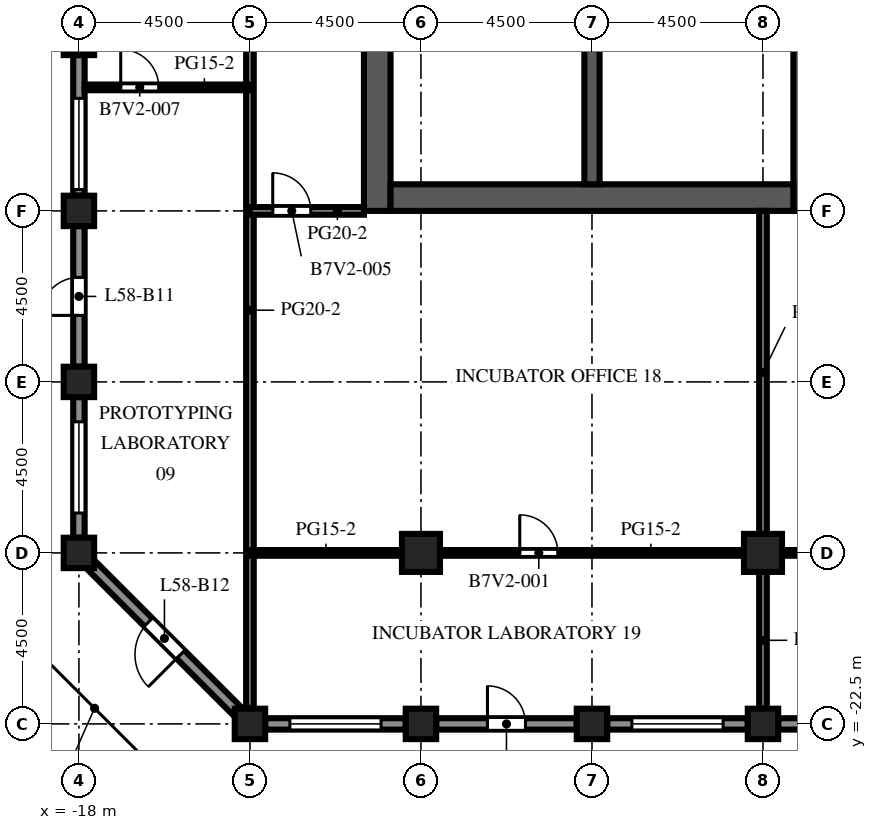
"""IFC4 building model, lengths in metres.
Left out: names, types, materials, properties, quantities, classifications, styles, units other than length and angle.
Written with IfcOpenShell. Run it as: python <this file> out.ifc"""

import sys

from ifc_helpers import new_model, si_unit, direction, frame, frame_2d, origin, origin_2d, place, context, subcontext, project, spatial, rectangle, extrude, element, fill, save


model = new_model("IFC4")
c1 = context("Model", 3, precision=1e-05, world=origin(), true_north=direction((0.0, 1.0)))
c2 = subcontext(c1, "Body", "Model", "MODEL_VIEW")
j1 = project(units=[si_unit("LENGTHUNIT", "METRE"), si_unit("PLANEANGLEUNIT", "RADIAN")], contexts=[c1])
p1 = place(None, origin())
s1 = spatial("IfcSite", under=j1, at=p1, CompositionType="ELEMENT")
p2 = place(p1, origin())
s2 = spatial("IfcBuilding", under=s1, at=p2, CompositionType="ELEMENT")
p3 = place(p2, frame((0.0, 0.0, 256.2)))
s3 = spatial("IfcBuildingStorey", under=s2, at=p3, CompositionType="ELEMENT", Elevation=256.2)
for number, where, z_axis, x_axis in (
    (1, (-18.0, -18.0, 0.0), (0.0, 0.0, 1.0), (1.0, 0.0, 0.0)),
    (2, (-18.0, -13.5, 0.0), (0.0, 0.0, 1.0), (1.0, 0.0, 0.0)),
    (3, (-18.0, -9.0, 0.0), (0.0, 0.0, 1.0), (1.0, 0.0, 0.0)),
    (4, (-18.0, -4.5, 0.0), (0.0, 0.0, 1.0), (1.0, 0.0, 0.0)),
    (5, (-13.5, -22.5, 0.0), (0.0, 0.0, 1.0), (1.0, 0.0, 0.0)),
    (6, (-9.0, -22.5, 0.0), (0.0, 0.0, 1.0), (1.0, 0.0, 0.0)),
    (7, (-4.5, -22.5, 0.0), (0.0, 0.0, 1.0), (1.0, 0.0, 0.0)),
    (8, (0.0, -22.5, 0.0), (0.0, 0.0, 1.0), (1.0, 0.0, 0.0)),
):
    element("IfcColumn", number, at=place(p3, frame(where, z_axis=z_axis, x_axis=x_axis)), inside=s3, PredefinedType="COLUMN", context=c2, shape_type="SweptSolid", body=[
        extrude(rectangle(XDim=0.8, YDim=0.8, at=origin_2d()), origin(), (0.0, 0.0, 1.0), 4.1),
    ])
for number, where, z_axis, x_axis in (
    (9, (-9.0, -18.0, 0.0), (0.0, 0.0, 1.0), (1.0, 0.0, 0.0)),
    (10, (0.0, -18.0, 0.0), (0.0, 0.0, 1.0), (1.0, 0.0, 0.0)),
):
    element("IfcColumn", number, at=place(p3, frame(where, z_axis=z_axis, x_axis=x_axis)), inside=s3, PredefinedType="COLUMN", context=c2, shape_type="SweptSolid", body=[
        extrude(rectangle(XDim=1.0, YDim=1.0, at=origin_2d()), origin(), (0.0, 0.0, 1.0), 4.1),
    ])
p4 = place(p3, frame((-10.15, -9.0, 0.0), z_axis=(0.0, 0.0, 1.0), x_axis=(0.0, 1.0, 0.0)))
e11 = element("IfcWall", 11, at=p4, inside=s3, PredefinedType="SHEAR", context=c2, shape_type="SweptSolid", body=[
    extrude(rectangle(XDim=27.5, YDim=0.7, at=frame_2d((13.75, 0.0))), origin(), (0.0, 0.0, 1.0), 4.1),
])
p5 = place(p4, frame((12.55, 0.0, 0.0)))
e12 = element("IfcOpeningElement", 12, at=p5, cuts=e11, PredefinedType="OPENING", context=c2, shape_type="SweptSolid", body=[
    extrude(rectangle(XDim=2.4, YDim=2.4, at=frame_2d((1.2, 1.2))), frame((0.0, 0.36, 0.0), z_axis=(0.0, -1.0, 0.0), x_axis=(1.0, 0.0, 0.0)), (0.0, 0.0, 1.0), 0.72),
])
p6 = place(p4, frame((6.825, 0.0, 0.0)))
e13 = element("IfcOpeningElement", 13, at=p6, cuts=e11, PredefinedType="OPENING", context=c2, shape_type="SweptSolid", body=[
    extrude(rectangle(XDim=1.2, YDim=2.1, at=frame_2d((0.6, 1.05))), frame((0.0, 0.36, 0.0), z_axis=(0.0, -1.0, 0.0), x_axis=(1.0, 0.0, 0.0)), (0.0, 0.0, 1.0), 0.72),
])
p7 = place(p4, frame((19.475, 0.0, 0.0)))
e14 = element("IfcOpeningElement", 14, at=p7, cuts=e11, PredefinedType="OPENING", context=c2, shape_type="SweptSolid", body=[
    extrude(rectangle(XDim=1.2, YDim=2.1, at=frame_2d((0.6, 1.05))), frame((0.0, 0.36, 0.0), z_axis=(0.0, -1.0, 0.0), x_axis=(1.0, 0.0, 0.0)), (0.0, 0.0, 1.0), 0.72),
])
p8 = place(p3, frame((1.15, -9.0, 0.0), z_axis=(0.0, 0.0, 1.0), x_axis=(0.0, 1.0, 0.0)))
e15 = element("IfcWall", 15, at=p8, inside=s3, PredefinedType="SHEAR", context=c2, shape_type="SweptSolid", body=[
    extrude(rectangle(XDim=27.5, YDim=0.7, at=frame_2d((13.75, 0.0))), origin(), (0.0, 0.0, 1.0), 4.1),
])
p9 = place(p8, frame((12.55, 0.0, 0.0)))
e16 = element("IfcOpeningElement", 16, at=p9, cuts=e15, PredefinedType="OPENING", context=c2, shape_type="SweptSolid", body=[
    extrude(rectangle(XDim=2.4, YDim=2.4, at=frame_2d((1.2, 1.2))), frame((0.0, 0.36, 0.0), z_axis=(0.0, -1.0, 0.0), x_axis=(1.0, 0.0, 0.0)), (0.0, 0.0, 1.0), 0.72),
])
p10 = place(p8, frame((3.788, 0.0, 0.0)))
e17 = element("IfcOpeningElement", 17, at=p10, cuts=e15, PredefinedType="OPENING", context=c2, shape_type="SweptSolid", body=[
    extrude(rectangle(XDim=0.968, YDim=2.1, at=frame_2d((0.484, 1.05))), frame((0.0, 0.36, 0.0), z_axis=(0.0, -1.0, 0.0), x_axis=(1.0, 0.0, 0.0)), (0.0, 0.0, 1.0), 0.72),
])
p11 = place(p8, frame((23.54, 0.0, 0.0)))
e18 = element("IfcOpeningElement", 18, at=p11, cuts=e15, PredefinedType="OPENING", context=c2, shape_type="SweptSolid", body=[
    extrude(rectangle(XDim=1.2, YDim=2.1, at=frame_2d((0.6, 1.05))), frame((0.0, 0.36, 0.0), z_axis=(0.0, -1.0, 0.0), x_axis=(1.0, 0.0, 0.0)), (0.0, 0.0, 1.0), 0.72),
])
p12 = place(p3, frame((-9.8, -8.65, 0.0), z_axis=(0.0, 0.0, 1.0), x_axis=(1.0, 0.0, 0.0)))
e19 = element("IfcWall", 19, at=p12, inside=s3, PredefinedType="SHEAR", context=c2, shape_type="SweptSolid", body=[
    extrude(rectangle(XDim=10.6, YDim=0.7, at=frame_2d((5.3, 0.0))), origin(), (0.0, 0.0, 1.0), 4.1),
])
p13 = place(p3, frame((-4.5, -8.3, 0.0), z_axis=(0.0, 0.0, 1.0), x_axis=(0.0, 1.0, 0.0)))
e20 = element("IfcWall", 20, at=p13, inside=s3, PredefinedType="SHEAR", context=c2, shape_type="SweptSolid", body=[
    extrude(rectangle(XDim=7.6, YDim=0.4, at=frame_2d((3.8, 0.0))), origin(), (0.0, 0.0, 1.0), 4.1),
])
p14 = place(p3, frame((-9.4, -22.5, 0.0), z_axis=(0.0, 0.0, 1.0), x_axis=(-1.0, 0.0, 0.0)))
e21 = element("IfcWall", 21, at=p14, inside=s3, PredefinedType="SOLIDWALL", context=c2, shape_type="SweptSolid", body=[
    extrude(rectangle(XDim=3.7, YDim=0.3, at=frame_2d((1.85, 0.0))), origin(), (0.0, 0.0, 1.0), 2.7),
])
p15 = place(p14, frame((0.65, 0.0, 0.8)))
e22 = element("IfcOpeningElement", 22, at=p15, cuts=e21, PredefinedType="OPENING", context=c2, shape_type="SweptSolid", body=[
    extrude(rectangle(XDim=2.4, YDim=1.7, at=frame_2d((1.2, 0.85))), frame((0.0, 0.16, 0.0), z_axis=(0.0, -1.0, 0.0), x_axis=(1.0, 0.0, 0.0)), (0.0, 0.0, 1.0), 0.32),
])
p16 = place(p3, frame((-4.9, -22.5, 0.0), z_axis=(0.0, 0.0, 1.0), x_axis=(-1.0, 0.0, 0.0)))
e23 = element("IfcWall", 23, at=p16, inside=s3, PredefinedType="SOLIDWALL", context=c2, shape_type="SweptSolid", body=[
    extrude(rectangle(XDim=3.7, YDim=0.3, at=frame_2d((1.85, 0.0))), origin(), (0.0, 0.0, 1.0), 2.7),
])
p17 = place(p16, frame((1.35, 0.0, 0.0)))
e24 = element("IfcOpeningElement", 24, at=p17, cuts=e23, PredefinedType="OPENING", context=c2, shape_type="SweptSolid", body=[
    extrude(rectangle(XDim=1.0, YDim=2.2, at=frame_2d((0.5, 1.1))), frame((0.0, 0.16, 0.0), z_axis=(0.0, -1.0, 0.0), x_axis=(1.0, 0.0, 0.0)), (0.0, 0.0, 1.0), 0.32),
])
p18 = place(p3, frame((-0.4, -22.5, 0.0), z_axis=(0.0, 0.0, 1.0), x_axis=(-1.0, 0.0, 0.0)))
e25 = element("IfcWall", 25, at=p18, inside=s3, PredefinedType="SOLIDWALL", context=c2, shape_type="SweptSolid", body=[
    extrude(rectangle(XDim=3.7, YDim=0.3, at=frame_2d((1.85, 0.0))), origin(), (0.0, 0.0, 1.0), 2.7),
])
p19 = place(p18, frame((0.65, 0.0, 0.8)))
e26 = element("IfcOpeningElement", 26, at=p19, cuts=e25, PredefinedType="OPENING", context=c2, shape_type="SweptSolid", body=[
    extrude(rectangle(XDim=2.4, YDim=1.7, at=frame_2d((1.2, 0.85))), frame((0.0, 0.16, 0.0), z_axis=(0.0, -1.0, 0.0), x_axis=(1.0, 0.0, 0.0)), (0.0, 0.0, 1.0), 0.32),
])
p20 = place(p3, frame((4.1, -22.5, 0.0), z_axis=(0.0, 0.0, 1.0), x_axis=(-1.0, 0.0, 0.0)))
e27 = element("IfcWall", 27, at=p20, inside=s3, PredefinedType="SOLIDWALL", context=c2, shape_type="SweptSolid", body=[
    extrude(rectangle(XDim=3.7, YDim=0.3, at=frame_2d((1.85, 0.0))), origin(), (0.0, 0.0, 1.0), 2.7),
])
p21 = place(p20, frame((0.65, 0.0, 0.8)))
e28 = element("IfcOpeningElement", 28, at=p21, cuts=e27, PredefinedType="OPENING", context=c2, shape_type="SweptSolid", body=[
    extrude(rectangle(XDim=2.4, YDim=1.7, at=frame_2d((1.2, 0.85))), frame((0.0, 0.16, 0.0), z_axis=(0.0, -1.0, 0.0), x_axis=(1.0, 0.0, 0.0)), (0.0, 0.0, 1.0), 0.32),
])
p22 = place(p3, frame((-18.0, -8.6, 0.0), z_axis=(0.0, 0.0, 1.0), x_axis=(0.0, 1.0, 0.0)))
e29 = element("IfcWall", 29, at=p22, inside=s3, PredefinedType="SOLIDWALL", context=c2, shape_type="SweptSolid", body=[
    extrude(rectangle(XDim=3.7, YDim=0.3, at=frame_2d((1.85, 0.0))), origin(), (0.0, 0.0, 1.0), 2.7),
])
p23 = place(p22, frame((0.163, 0.0, 0.8)))
e30 = element("IfcOpeningElement", 30, at=p23, cuts=e29, PredefinedType="OPENING", context=c2, shape_type="SweptSolid", body=[
    extrude(rectangle(XDim=2.4, YDim=1.7, at=frame_2d((1.2, 0.85))), frame((0.0, 0.16, 0.0), z_axis=(0.0, -1.0, 0.0), x_axis=(1.0, 0.0, 0.0)), (0.0, 0.0, 1.0), 0.32),
])
p24 = place(p3, frame((-18.0, -13.1, 0.0), z_axis=(0.0, 0.0, 1.0), x_axis=(0.0, 1.0, 0.0)))
e31 = element("IfcWall", 31, at=p24, inside=s3, PredefinedType="SOLIDWALL", context=c2, shape_type="SweptSolid", body=[
    extrude(rectangle(XDim=3.7, YDim=0.3, at=frame_2d((1.85, 0.0))), origin(), (0.0, 0.0, 1.0), 2.7),
])
p25 = place(p24, frame((1.35, 0.0, 0.0)))
e32 = element("IfcOpeningElement", 32, at=p25, cuts=e31, PredefinedType="OPENING", context=c2, shape_type="SweptSolid", body=[
    extrude(rectangle(XDim=1.0, YDim=2.2, at=frame_2d((0.5, 1.1))), frame((0.0, 0.16, 0.0), z_axis=(0.0, -1.0, 0.0), x_axis=(1.0, 0.0, 0.0)), (0.0, 0.0, 1.0), 0.32),
])
p26 = place(p3, frame((-18.0, -17.6, 0.0), z_axis=(0.0, 0.0, 1.0), x_axis=(0.0, 1.0, 0.0)))
e33 = element("IfcWall", 33, at=p26, inside=s3, PredefinedType="SOLIDWALL", context=c2, shape_type="SweptSolid", body=[
    extrude(rectangle(XDim=3.7, YDim=0.3, at=frame_2d((1.85, 0.0))), origin(), (0.0, 0.0, 1.0), 2.7),
])
p27 = place(p26, frame((0.65, 0.0, 0.8)))
e34 = element("IfcOpeningElement", 34, at=p27, cuts=e33, PredefinedType="OPENING", context=c2, shape_type="SweptSolid", body=[
    extrude(rectangle(XDim=2.4, YDim=1.7, at=frame_2d((1.2, 0.85))), frame((0.0, 0.16, 0.0), z_axis=(0.0, -1.0, 0.0), x_axis=(1.0, 0.0, 0.0)), (0.0, 0.0, 1.0), 0.32),
])
p28 = place(p3, frame((-13.794, -22.206, 0.0), z_axis=(0.0, 0.0, 1.0), x_axis=(-0.707106781187, 0.707106781187, 0.0)))
e35 = element("IfcWall", 35, at=p28, inside=s3, PredefinedType="SOLIDWALL", context=c2, shape_type="SweptSolid", body=[
    extrude(rectangle(XDim=5.532, YDim=0.3, at=frame_2d((2.766, 0.0))), origin(), (0.0, 0.0, 1.0), 2.7),
])
p29 = place(p28, frame((2.166, 0.0, 0.0)))
e36 = element("IfcOpeningElement", 36, at=p29, cuts=e35, PredefinedType="OPENING", context=c2, shape_type="SweptSolid", body=[
    extrude(rectangle(XDim=1.2, YDim=2.2, at=frame_2d((0.6, 1.1))), frame((0.0, 0.16, 0.0), z_axis=(0.0, -1.0, 0.0), x_axis=(1.0, 0.0, 0.0)), (0.0, 0.0, 1.0), 0.32),
])
p30 = place(p3, frame((-4.3, -5.412, 0.0), z_axis=(0.0, 0.0, 1.0), x_axis=(1.0, 0.0, 0.0)))
e37 = element("IfcWall", 37, at=p30, inside=s3, PredefinedType="PARTITIONING", context=c2, shape_type="SweptSolid", body=[
    extrude(rectangle(XDim=5.1, YDim=0.1, at=frame_2d((2.55, 0.0))), origin(), (0.0, 0.0, 1.0), 3.5),
])
p31 = place(p30, frame((2.05, 0.0, 0.0)))
e38 = element("IfcOpeningElement", 38, at=p31, cuts=e37, PredefinedType="OPENING", context=c2, shape_type="SweptSolid", body=[
    extrude(rectangle(XDim=1.0, YDim=2.1, at=frame_2d((0.5, 1.05))), frame((0.0, 0.06, 0.0), z_axis=(0.0, -1.0, 0.0), x_axis=(1.0, 0.0, 0.0)), (0.0, 0.0, 1.0), 0.12),
])
p32 = place(p3, frame((-13.5, -22.077, 0.0), z_axis=(0.0, 0.0, 1.0), x_axis=(0.0, 1.0, 0.0)))
e39 = element("IfcWall", 39, at=p32, inside=s3, PredefinedType="PARTITIONING", context=c2, shape_type="SweptSolid", body=[
    extrude(rectangle(XDim=25.327, YDim=0.2, at=frame_2d((12.664, 0.0))), origin(), (0.0, 0.0, 1.0), 3.5),
])
p33 = place(p32, frame((20.927, 0.0, 0.0)))
e40 = element("IfcOpeningElement", 40, at=p33, cuts=e39, PredefinedType="OPENING", context=c2, shape_type="SweptSolid", body=[
    extrude(rectangle(XDim=1.0, YDim=2.1, at=frame_2d((0.5, 1.05))), frame((0.0, 0.11, 0.0), z_axis=(0.0, -1.0, 0.0), x_axis=(1.0, 0.0, 0.0)), (0.0, 0.0, 1.0), 0.22),
])
p34 = place(p3, frame((0.0, -22.1, 0.0), z_axis=(0.0, 0.0, 1.0), x_axis=(0.0, 1.0, 0.0)))
e41 = element("IfcWall", 41, at=p34, inside=s3, PredefinedType="PARTITIONING", context=c2, shape_type="SweptSolid", body=[
    extrude(rectangle(XDim=3.6, YDim=0.2, at=frame_2d((1.8, 0.0))), origin(), (0.0, 0.0, 1.0), 3.5),
])
p35 = place(p3, frame((0.0, -17.5, 0.0), z_axis=(0.0, 0.0, 1.0), x_axis=(0.0, 1.0, 0.0)))
e42 = element("IfcWall", 42, at=p35, inside=s3, PredefinedType="PARTITIONING", context=c2, shape_type="SweptSolid", body=[
    extrude(rectangle(XDim=8.5, YDim=0.2, at=frame_2d((4.25, 0.0))), origin(), (0.0, 0.0, 1.0), 3.5),
])
p36 = place(p3, frame((-13.5, -18.0, 0.0), z_axis=(0.0, 0.0, 1.0), x_axis=(1.0, 0.0, 0.0)))
e43 = element("IfcWall", 43, at=p36, inside=s3, PredefinedType="PARTITIONING", context=c2, shape_type="SweptSolid", body=[
    extrude(rectangle(XDim=4.0, YDim=0.15, at=frame_2d((2.0, 0.0))), origin(), (0.0, 0.0, 1.0), 3.5),
])
p37 = place(p3, frame((-0.5, -18.0, 0.0), z_axis=(0.0, 0.0, 1.0), x_axis=(-1.0, 0.0, 0.0)))
e44 = element("IfcWall", 44, at=p37, inside=s3, PredefinedType="PARTITIONING", context=c2, shape_type="SweptSolid", body=[
    extrude(rectangle(XDim=8.0, YDim=0.15, at=frame_2d((4.0, 0.0))), origin(), (0.0, 0.0, 1.0), 3.5),
])
p38 = place(p37, frame((4.9, 0.0, 0.0)))
e45 = element("IfcOpeningElement", 45, at=p38, cuts=e44, PredefinedType="OPENING", context=c2, shape_type="SweptSolid", body=[
    extrude(rectangle(XDim=1.0, YDim=2.1, at=frame_2d((0.5, 1.05))), frame((0.0, 0.085, 0.0), z_axis=(0.0, -1.0, 0.0), x_axis=(1.0, 0.0, 0.0)), (0.0, 0.0, 1.0), 0.17),
])
p39 = place(p3, frame((8.5, -18.0, 0.0), z_axis=(0.0, 0.0, 1.0), x_axis=(-1.0, 0.0, 0.0)))
e46 = element("IfcWall", 46, at=p39, inside=s3, PredefinedType="PARTITIONING", context=c2, shape_type="SweptSolid", body=[
    extrude(rectangle(XDim=8.0, YDim=0.15, at=frame_2d((4.0, 0.0))), origin(), (0.0, 0.0, 1.0), 3.5),
])
p40 = place(p39, frame((0.65, 0.0, 0.0)))
e47 = element("IfcOpeningElement", 47, at=p40, cuts=e46, PredefinedType="OPENING", context=c2, shape_type="SweptSolid", body=[
    extrude(rectangle(XDim=1.0, YDim=2.1, at=frame_2d((0.5, 1.05))), frame((0.0, 0.085, 0.0), z_axis=(0.0, -1.0, 0.0), x_axis=(1.0, 0.0, 0.0)), (0.0, 0.0, 1.0), 0.17),
])
p41 = place(p3, frame((-10.5, -9.0, 0.0), z_axis=(0.0, 0.0, 1.0), x_axis=(-1.0, 0.0, 0.0)))
e48 = element("IfcWall", 48, at=p41, inside=s3, PredefinedType="PARTITIONING", context=c2, shape_type="SweptSolid", body=[
    extrude(rectangle(XDim=3.0, YDim=0.2, at=frame_2d((1.5, 0.0))), origin(), (0.0, 0.0, 1.0), 3.5),
])
p42 = place(p41, frame((1.4, 0.0, 0.0)))
e49 = element("IfcOpeningElement", 49, at=p42, cuts=e48, PredefinedType="OPENING", context=c2, shape_type="SweptSolid", body=[
    extrude(rectangle(XDim=1.0, YDim=2.1, at=frame_2d((0.5, 1.05))), frame((0.0, 0.11, 0.0), z_axis=(0.0, -1.0, 0.0), x_axis=(1.0, 0.0, 0.0)), (0.0, 0.0, 1.0), 0.22),
])
p43 = place(p3, frame((-13.5, -5.75, 0.0), z_axis=(0.0, 0.0, 1.0), x_axis=(-1.0, 0.0, 0.0)))
e50 = element("IfcWall", 50, at=p43, inside=s3, PredefinedType="PARTITIONING", context=c2, shape_type="SweptSolid", body=[
    extrude(rectangle(XDim=4.35, YDim=0.15, at=frame_2d((2.175, 0.0))), origin(), (0.0, 0.0, 1.0), 3.5),
])
p44 = place(p43, frame((2.4, 0.0, 0.0)))
e51 = element("IfcOpeningElement", 51, at=p44, cuts=e50, PredefinedType="OPENING", context=c2, shape_type="SweptSolid", body=[
    extrude(rectangle(XDim=1.0, YDim=2.1, at=frame_2d((0.5, 1.05))), frame((0.0, 0.085, 0.0), z_axis=(0.0, -1.0, 0.0), x_axis=(1.0, 0.0, 0.0)), (0.0, 0.0, 1.0), 0.17),
])
p45 = place(p15, origin())
e52 = element("IfcWindow", 52, at=p45, inside=s3, PartitioningType="SINGLE_PANEL", PredefinedType="WINDOW", context=c2, shape_type="SweptSolid", body=[
    extrude(rectangle(XDim=2.4, YDim=1.7, at=frame_2d((1.2, 0.85))), frame((0.0, 0.03, 0.0), z_axis=(0.0, -1.0, 0.0), x_axis=(1.0, 0.0, 0.0)), (0.0, 0.0, 1.0), 0.06),
])
fill(e22, e52)
p46 = place(p17, origin())
e53 = element("IfcDoor", 53, at=p46, inside=s3, OperationType="SINGLE_SWING_RIGHT", PredefinedType="DOOR", context=c2, shape_type="SweptSolid", body=[
    extrude(rectangle(XDim=1.0, YDim=2.2, at=frame_2d((0.5, 1.1))), frame((0.0, 0.025, 0.0), z_axis=(0.0, -1.0, 0.0), x_axis=(1.0, 0.0, 0.0)), (0.0, 0.0, 1.0), 0.05),
])
fill(e24, e53)
p47 = place(p19, origin())
e54 = element("IfcWindow", 54, at=p47, inside=s3, PartitioningType="SINGLE_PANEL", PredefinedType="WINDOW", context=c2, shape_type="SweptSolid", body=[
    extrude(rectangle(XDim=2.4, YDim=1.7, at=frame_2d((1.2, 0.85))), frame((0.0, 0.03, 0.0), z_axis=(0.0, -1.0, 0.0), x_axis=(1.0, 0.0, 0.0)), (0.0, 0.0, 1.0), 0.06),
])
fill(e26, e54)
p48 = place(p23, origin())
e55 = element("IfcWindow", 55, at=p48, inside=s3, PartitioningType="SINGLE_PANEL", PredefinedType="WINDOW", context=c2, shape_type="SweptSolid", body=[
    extrude(rectangle(XDim=2.4, YDim=1.7, at=frame_2d((1.2, 0.85))), frame((0.0, 0.03, 0.0), z_axis=(0.0, -1.0, 0.0), x_axis=(1.0, 0.0, 0.0)), (0.0, 0.0, 1.0), 0.06),
])
fill(e30, e55)
p49 = place(p25, origin())
e56 = element("IfcDoor", 56, at=p49, inside=s3, OperationType="SINGLE_SWING_LEFT", PredefinedType="DOOR", context=c2, shape_type="SweptSolid", body=[
    extrude(rectangle(XDim=1.0, YDim=2.2, at=frame_2d((0.5, 1.1))), frame((0.0, 0.025, 0.0), z_axis=(0.0, -1.0, 0.0), x_axis=(1.0, 0.0, 0.0)), (0.0, 0.0, 1.0), 0.05),
])
fill(e32, e56)
p50 = place(p27, origin())
e57 = element("IfcWindow", 57, at=p50, inside=s3, PartitioningType="SINGLE_PANEL", PredefinedType="WINDOW", context=c2, shape_type="SweptSolid", body=[
    extrude(rectangle(XDim=2.4, YDim=1.7, at=frame_2d((1.2, 0.85))), frame((0.0, 0.03, 0.0), z_axis=(0.0, -1.0, 0.0), x_axis=(1.0, 0.0, 0.0)), (0.0, 0.0, 1.0), 0.06),
])
fill(e34, e57)
p51 = place(p29, origin())
e58 = element("IfcDoor", 58, at=p51, inside=s3, OperationType="SINGLE_SWING_LEFT", PredefinedType="DOOR", context=c2, shape_type="SweptSolid", body=[
    extrude(rectangle(XDim=1.2, YDim=2.2, at=frame_2d((0.6, 1.1))), frame((0.0, 0.025, 0.0), z_axis=(0.0, -1.0, 0.0), x_axis=(1.0, 0.0, 0.0)), (0.0, 0.0, 1.0), 0.05),
])
fill(e36, e58)
p52 = place(p10, origin())
e59 = element("IfcDoor", 59, at=p52, inside=s3, OperationType="SINGLE_SWING_LEFT", PredefinedType="DOOR", context=c2, shape_type="SweptSolid", body=[
    extrude(rectangle(XDim=0.968, YDim=2.1, at=frame_2d((0.484, 1.05))), frame((0.0, 0.325, 0.0), z_axis=(0.0, -1.0, 0.0), x_axis=(1.0, 0.0, 0.0)), (0.0, 0.0, 1.0), 0.05),
])
fill(e17, e59)
p53 = place(p31, origin())
e60 = element("IfcDoor", 60, at=p53, inside=s3, OperationType="SINGLE_SWING_RIGHT", PredefinedType="DOOR", context=c2, shape_type="SweptSolid", body=[
    extrude(rectangle(XDim=1.0, YDim=2.1, at=frame_2d((0.5, 1.05))), frame((0.0, 0.025, 0.0), z_axis=(0.0, -1.0, 0.0), x_axis=(1.0, 0.0, 0.0)), (0.0, 0.0, 1.0), 0.05),
])
fill(e38, e60)
p54 = place(p38, origin())
e61 = element("IfcDoor", 61, at=p54, inside=s3, OperationType="SINGLE_SWING_RIGHT", PredefinedType="DOOR", context=c2, shape_type="SweptSolid", body=[
    extrude(rectangle(XDim=1.0, YDim=2.1, at=frame_2d((0.5, 1.05))), frame((0.0, 0.025, 0.0), z_axis=(0.0, -1.0, 0.0), x_axis=(1.0, 0.0, 0.0)), (0.0, 0.0, 1.0), 0.05),
])
fill(e45, e61)
p55 = place(p42, origin())
e62 = element("IfcDoor", 62, at=p55, inside=s3, OperationType="SINGLE_SWING_RIGHT", PredefinedType="DOOR", context=c2, shape_type="SweptSolid", body=[
    extrude(rectangle(XDim=1.0, YDim=2.1, at=frame_2d((0.5, 1.05))), frame((0.0, 0.025, 0.0), z_axis=(0.0, -1.0, 0.0), x_axis=(1.0, 0.0, 0.0)), (0.0, 0.0, 1.0), 0.05),
])
fill(e49, e62)
p56 = place(p44, origin())
e63 = element("IfcDoor", 63, at=p56, inside=s3, OperationType="SINGLE_SWING_RIGHT", PredefinedType="DOOR", context=c2, shape_type="SweptSolid", body=[
    extrude(rectangle(XDim=1.0, YDim=2.1, at=frame_2d((0.5, 1.05))), frame((0.0, 0.025, 0.0), z_axis=(0.0, -1.0, 0.0), x_axis=(1.0, 0.0, 0.0)), (0.0, 0.0, 1.0), 0.05),
])
fill(e51, e63)
save(model, sys.argv[1])
